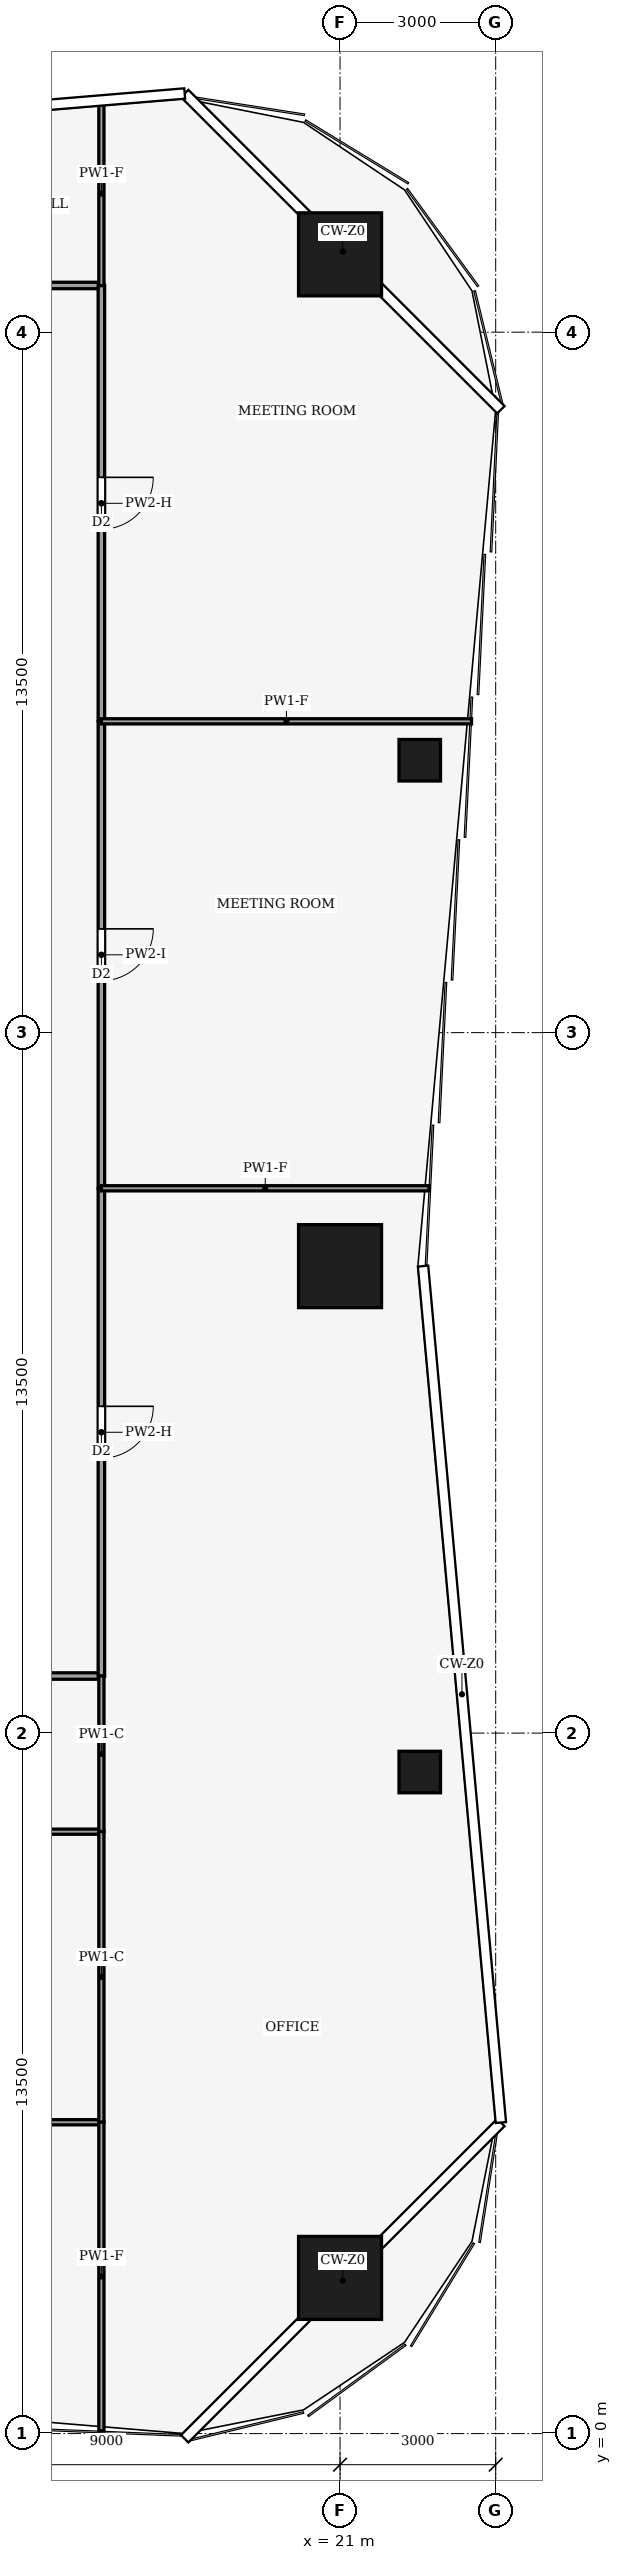
"""IFC4 building model, lengths in metres.
Left out: names, types, materials, properties, quantities, classifications, styles, units other than length and angle.
Written with IfcOpenShell. Run it as: python <this file> out.ifc"""

import sys

from ifc_helpers import new_model, si_unit, direction, frame, frame_2d, origin, origin_2d, place, context, subcontext, project, spatial, rectangle, hollow_rectangle, extrude, element, fill, save


model = new_model("IFC4")
c1 = context("Model", 3, precision=1e-05, world=origin(), true_north=direction((0.0, 1.0)))
c2 = subcontext(c1, "Body", "Model", "MODEL_VIEW")
j1 = project(units=[si_unit("LENGTHUNIT", "METRE"), si_unit("PLANEANGLEUNIT", "RADIAN")], contexts=[c1])
p1 = place(None, origin())
s1 = spatial("IfcSite", under=j1, at=p1, CompositionType="ELEMENT")
p2 = place(p1, origin())
s2 = spatial("IfcBuilding", under=s1, at=p2, CompositionType="ELEMENT")
p3 = place(p2, frame((0.0, 0.0, 22.0)))
s3 = spatial("IfcBuildingStorey", under=s2, at=p3, CompositionType="ELEMENT", Elevation=22.0)
for number, where, z_axis, x_axis in (
    (1, (21.0, 42.0, 0.0), (0.0, 0.0, 1.0), (1.0, 0.0, 0.0)),
    (2, (21.0, 22.5, 0.0), (0.0, 0.0, 1.0), (1.0, 0.0, 0.0)),
    (3, (21.0, 3.0, 0.0), (0.0, 0.0, 1.0), (1.0, 0.0, 0.0)),
):
    element("IfcColumn", number, at=place(p3, frame(where, z_axis=z_axis, x_axis=x_axis)), inside=s3, PredefinedType="COLUMN", context=c2, shape_type="SweptSolid", body=[
        extrude(hollow_rectangle(XDim=1.6, YDim=1.6, WallThickness=0.09, at=origin_2d()), origin(), (0.0, 0.0, 1.0), 4.0),
    ])
for number, where, z_axis, x_axis in (
    (4, (22.536, 12.75, 0.0), (0.0, 0.0, 1.0), (1.0, 0.0, 0.0)),
    (5, (22.536, 32.25, 0.0), (0.0, 0.0, 1.0), (1.0, 0.0, 0.0)),
):
    element("IfcColumn", number, at=place(p3, frame(where, z_axis=z_axis, x_axis=x_axis)), inside=s3, PredefinedType="COLUMN", context=c2, shape_type="SweptSolid", body=[
        extrude(hollow_rectangle(XDim=0.8, YDim=0.8, WallThickness=0.04, at=origin_2d()), origin(), (0.0, 0.0, 1.0), 4.0),
    ])
p4 = place(p3, frame((16.4, 14.6, 0.0), z_axis=(0.0, 0.0, 1.0), x_axis=(-1.0, 0.0, 0.0)))
e6 = element("IfcWall", 6, at=p4, inside=s3, PredefinedType="PARTITIONING", context=c2, shape_type="SweptSolid", body=[
    extrude(rectangle(XDim=7.4, YDim=0.125, at=frame_2d((3.7, 0.0))), origin(), (0.0, 0.0, 1.0), 3.29),
])
p5 = place(p4, frame((3.2, 0.0, 0.0)))
e7 = element("IfcOpeningElement", 7, at=p5, cuts=e6, PredefinedType="OPENING", context=c2, shape_type="SweptSolid", body=[
    extrude(rectangle(XDim=1.0, YDim=2.1, at=frame_2d((0.5, 1.05))), frame((0.0, 0.073, 0.0), z_axis=(0.0, -1.0, 0.0), x_axis=(1.0, 0.0, 0.0)), (0.0, 0.0, 1.0), 0.145),
])
p6 = place(p3, frame((-3.0, 41.4, 0.0), z_axis=(0.0, 0.0, 1.0), x_axis=(1.0, 0.0, 0.0)))
e8 = element("IfcWall", 8, at=p6, inside=s3, PredefinedType="PARTITIONING", context=c2, shape_type="SweptSolid", body=[
    extrude(rectangle(XDim=19.4, YDim=0.125, at=frame_2d((9.7, 0.0))), origin(), (0.0, 0.0, 1.0), 3.54),
])
p7 = place(p6, frame((9.2, 0.0, 0.0)))
e9 = element("IfcOpeningElement", 9, at=p7, cuts=e8, PredefinedType="OPENING", context=c2, shape_type="SweptSolid", body=[
    extrude(rectangle(XDim=1.0, YDim=2.1, at=frame_2d((0.5, 1.05))), frame((0.0, 0.073, 0.0), z_axis=(0.0, -1.0, 0.0), x_axis=(1.0, 0.0, 0.0)), (0.0, 0.0, 1.0), 0.145),
])
p8 = place(p3, frame((16.4, 24.0, 0.0), z_axis=(0.0, 0.0, 1.0), x_axis=(0.0, -1.0, 0.0)))
e10 = element("IfcWall", 10, at=p8, inside=s3, PredefinedType="PARTITIONING", context=c2, shape_type="SweptSolid", body=[
    extrude(rectangle(XDim=9.404, YDim=0.125, at=frame_2d((4.702, 0.0))), origin(), (0.0, 0.0, 1.0), 3.14),
])
p9 = place(p8, frame((4.202, 0.0, 0.0)))
e11 = element("IfcOpeningElement", 11, at=p9, cuts=e10, PredefinedType="OPENING", context=c2, shape_type="SweptSolid", body=[
    extrude(rectangle(XDim=1.0, YDim=2.1, at=frame_2d((0.5, 1.05))), frame((0.0, 0.073, 0.0), z_axis=(0.0, -1.0, 0.0), x_axis=(1.0, 0.0, 0.0)), (0.0, 0.0, 1.0), 0.145),
])
p10 = place(p3, frame((16.4, 33.0, 0.0), z_axis=(0.0, 0.0, 1.0), x_axis=(0.0, -1.0, 0.0)))
e12 = element("IfcWall", 12, at=p10, inside=s3, PredefinedType="PARTITIONING", context=c2, shape_type="SweptSolid", body=[
    extrude(rectangle(XDim=9.0, YDim=0.125, at=frame_2d((4.5, 0.0))), origin(), (0.0, 0.0, 1.0), 3.48),
])
p11 = place(p10, frame((4.0, 0.0, 0.0)))
e13 = element("IfcOpeningElement", 13, at=p11, cuts=e12, PredefinedType="OPENING", context=c2, shape_type="SweptSolid", body=[
    extrude(rectangle(XDim=1.0, YDim=2.1, at=frame_2d((0.5, 1.05))), frame((0.0, 0.073, 0.0), z_axis=(0.0, -1.0, 0.0), x_axis=(1.0, 0.0, 0.0)), (0.0, 0.0, 1.0), 0.145),
])
p12 = place(p3, frame((16.4, 41.404, 0.0), z_axis=(0.0, 0.0, 1.0), x_axis=(0.0, -1.0, 0.0)))
e14 = element("IfcWall", 14, at=p12, inside=s3, PredefinedType="PARTITIONING", context=c2, shape_type="SweptSolid", body=[
    extrude(rectangle(XDim=8.404, YDim=0.125, at=frame_2d((4.202, 0.0))), origin(), (0.0, 0.0, 1.0), 3.14),
])
p13 = place(p12, frame((3.702, 0.0, 0.0)))
e15 = element("IfcOpeningElement", 15, at=p13, cuts=e14, PredefinedType="OPENING", context=c2, shape_type="SweptSolid", body=[
    extrude(rectangle(XDim=1.0, YDim=2.1, at=frame_2d((0.5, 1.05))), frame((0.0, 0.073, 0.0), z_axis=(0.0, -1.0, 0.0), x_axis=(1.0, 0.0, 0.0)), (0.0, 0.0, 1.0), 0.145),
])
p14 = place(p3, frame((8.996, 11.6, 0.0), z_axis=(0.0, 0.0, 1.0), x_axis=(1.0, 0.0, 0.0)))
e16 = element("IfcWall", 16, at=p14, inside=s3, PredefinedType="PARTITIONING", context=c2, shape_type="SweptSolid", body=[
    extrude(rectangle(XDim=7.404, YDim=0.1, at=frame_2d((3.702, 0.0))), origin(), (0.0, 0.0, 1.0), 3.29),
])
p15 = place(p3, frame((16.4, 11.596, 0.0), z_axis=(0.0, 0.0, 1.0), x_axis=(0.0, 1.0, 0.0)))
e17 = element("IfcWall", 17, at=p15, inside=s3, PredefinedType="PARTITIONING", context=c2, shape_type="SweptSolid", body=[
    extrude(rectangle(XDim=3.008, YDim=0.1, at=frame_2d((1.504, 0.0))), origin(), (0.0, 0.0, 1.0), 3.87),
])
p16 = place(p3, frame((16.4, 6.0, 0.0), z_axis=(0.0, 0.0, 1.0), x_axis=(-1.0, 0.0, 0.0)))
e18 = element("IfcWall", 18, at=p16, inside=s3, PredefinedType="PARTITIONING", context=c2, shape_type="SweptSolid", body=[
    extrude(rectangle(XDim=4.4, YDim=0.1, at=frame_2d((2.2, 0.0))), origin(), (0.0, 0.0, 1.0), 3.29),
])
p17 = place(p16, frame((1.7, 0.0, 0.0)))
e19 = element("IfcOpeningElement", 19, at=p17, cuts=e18, PredefinedType="OPENING", context=c2, shape_type="SweptSolid", body=[
    extrude(rectangle(XDim=1.0, YDim=2.1, at=frame_2d((0.5, 1.05))), frame((0.0, 0.06, 0.0), z_axis=(0.0, -1.0, 0.0), x_axis=(1.0, 0.0, 0.0)), (0.0, 0.0, 1.0), 0.12),
])
p18 = place(p3, frame((16.4, 5.996, 0.0), z_axis=(0.0, 0.0, 1.0), x_axis=(0.0, 1.0, 0.0)))
e20 = element("IfcWall", 20, at=p18, inside=s3, PredefinedType="PARTITIONING", context=c2, shape_type="SweptSolid", body=[
    extrude(rectangle(XDim=5.608, YDim=0.1, at=frame_2d((2.804, 0.0))), origin(), (0.0, 0.0, 1.0), 3.87),
])
p19 = place(p3, frame((16.4, 0.053, 0.0), z_axis=(0.0, 0.0, 1.0), x_axis=(0.0, 1.0, 0.0)))
e21 = element("IfcWall", 21, at=p19, inside=s3, PredefinedType="PARTITIONING", context=c2, shape_type="SweptSolid", body=[
    extrude(rectangle(XDim=5.951, YDim=0.1, at=frame_2d((2.975, 0.0))), origin(), (0.0, 0.0, 1.0), 3.04),
])
p20 = place(p3, frame((16.4, 41.396, 0.0), z_axis=(0.0, 0.0, 1.0), x_axis=(0.0, 1.0, 0.0)))
e22 = element("IfcWall", 22, at=p20, inside=s3, PredefinedType="PARTITIONING", context=c2, shape_type="SweptSolid", body=[
    extrude(rectangle(XDim=3.551, YDim=0.1, at=frame_2d((1.775, 0.0))), origin(), (0.0, 0.0, 1.0), 3.04),
])
p21 = place(p3, frame((22.716, 24.0, 0.0), z_axis=(0.0, 0.0, 1.0), x_axis=(-1.0, 0.0, 0.0)))
e23 = element("IfcWall", 23, at=p21, inside=s3, PredefinedType="PARTITIONING", context=c2, shape_type="SweptSolid", body=[
    extrude(rectangle(XDim=6.316, YDim=0.1, at=frame_2d((3.158, 0.0))), origin(), (0.0, 0.0, 1.0), 3.04),
])
p22 = place(p3, frame((23.534, 33.0, 0.0), z_axis=(0.0, 0.0, 1.0), x_axis=(-1.0, 0.0, 0.0)))
e24 = element("IfcWall", 24, at=p22, inside=s3, PredefinedType="PARTITIONING", context=c2, shape_type="SweptSolid", body=[
    extrude(rectangle(XDim=7.135, YDim=0.1, at=frame_2d((3.567, 0.0))), origin(), (0.0, 0.0, 1.0), 3.04),
])
p23 = place(p9, origin())
e25 = element("IfcDoor", 25, at=p23, inside=s3, OperationType="SINGLE_SWING_RIGHT", PredefinedType="DOOR", context=c2, shape_type="SweptSolid", body=[
    extrude(rectangle(XDim=1.0, YDim=2.1, at=frame_2d((0.5, 1.05))), frame((0.0, 0.025, 0.0), z_axis=(0.0, -1.0, 0.0), x_axis=(1.0, 0.0, 0.0)), (0.0, 0.0, 1.0), 0.05),
])
fill(e11, e25)
p24 = place(p11, origin())
e26 = element("IfcDoor", 26, at=p24, inside=s3, OperationType="SINGLE_SWING_LEFT", PredefinedType="DOOR", context=c2, shape_type="SweptSolid", body=[
    extrude(rectangle(XDim=1.0, YDim=2.1, at=frame_2d((0.5, 1.05))), frame((0.0, 0.025, 0.0), z_axis=(0.0, -1.0, 0.0), x_axis=(1.0, 0.0, 0.0)), (0.0, 0.0, 1.0), 0.05),
])
fill(e13, e26)
p25 = place(p13, origin())
e27 = element("IfcDoor", 27, at=p25, inside=s3, OperationType="SINGLE_SWING_RIGHT", PredefinedType="DOOR", context=c2, shape_type="SweptSolid", body=[
    extrude(rectangle(XDim=1.0, YDim=2.1, at=frame_2d((0.5, 1.05))), frame((0.0, 0.025, 0.0), z_axis=(0.0, -1.0, 0.0), x_axis=(1.0, 0.0, 0.0)), (0.0, 0.0, 1.0), 0.05),
])
fill(e15, e27)
save(model, sys.argv[1])
